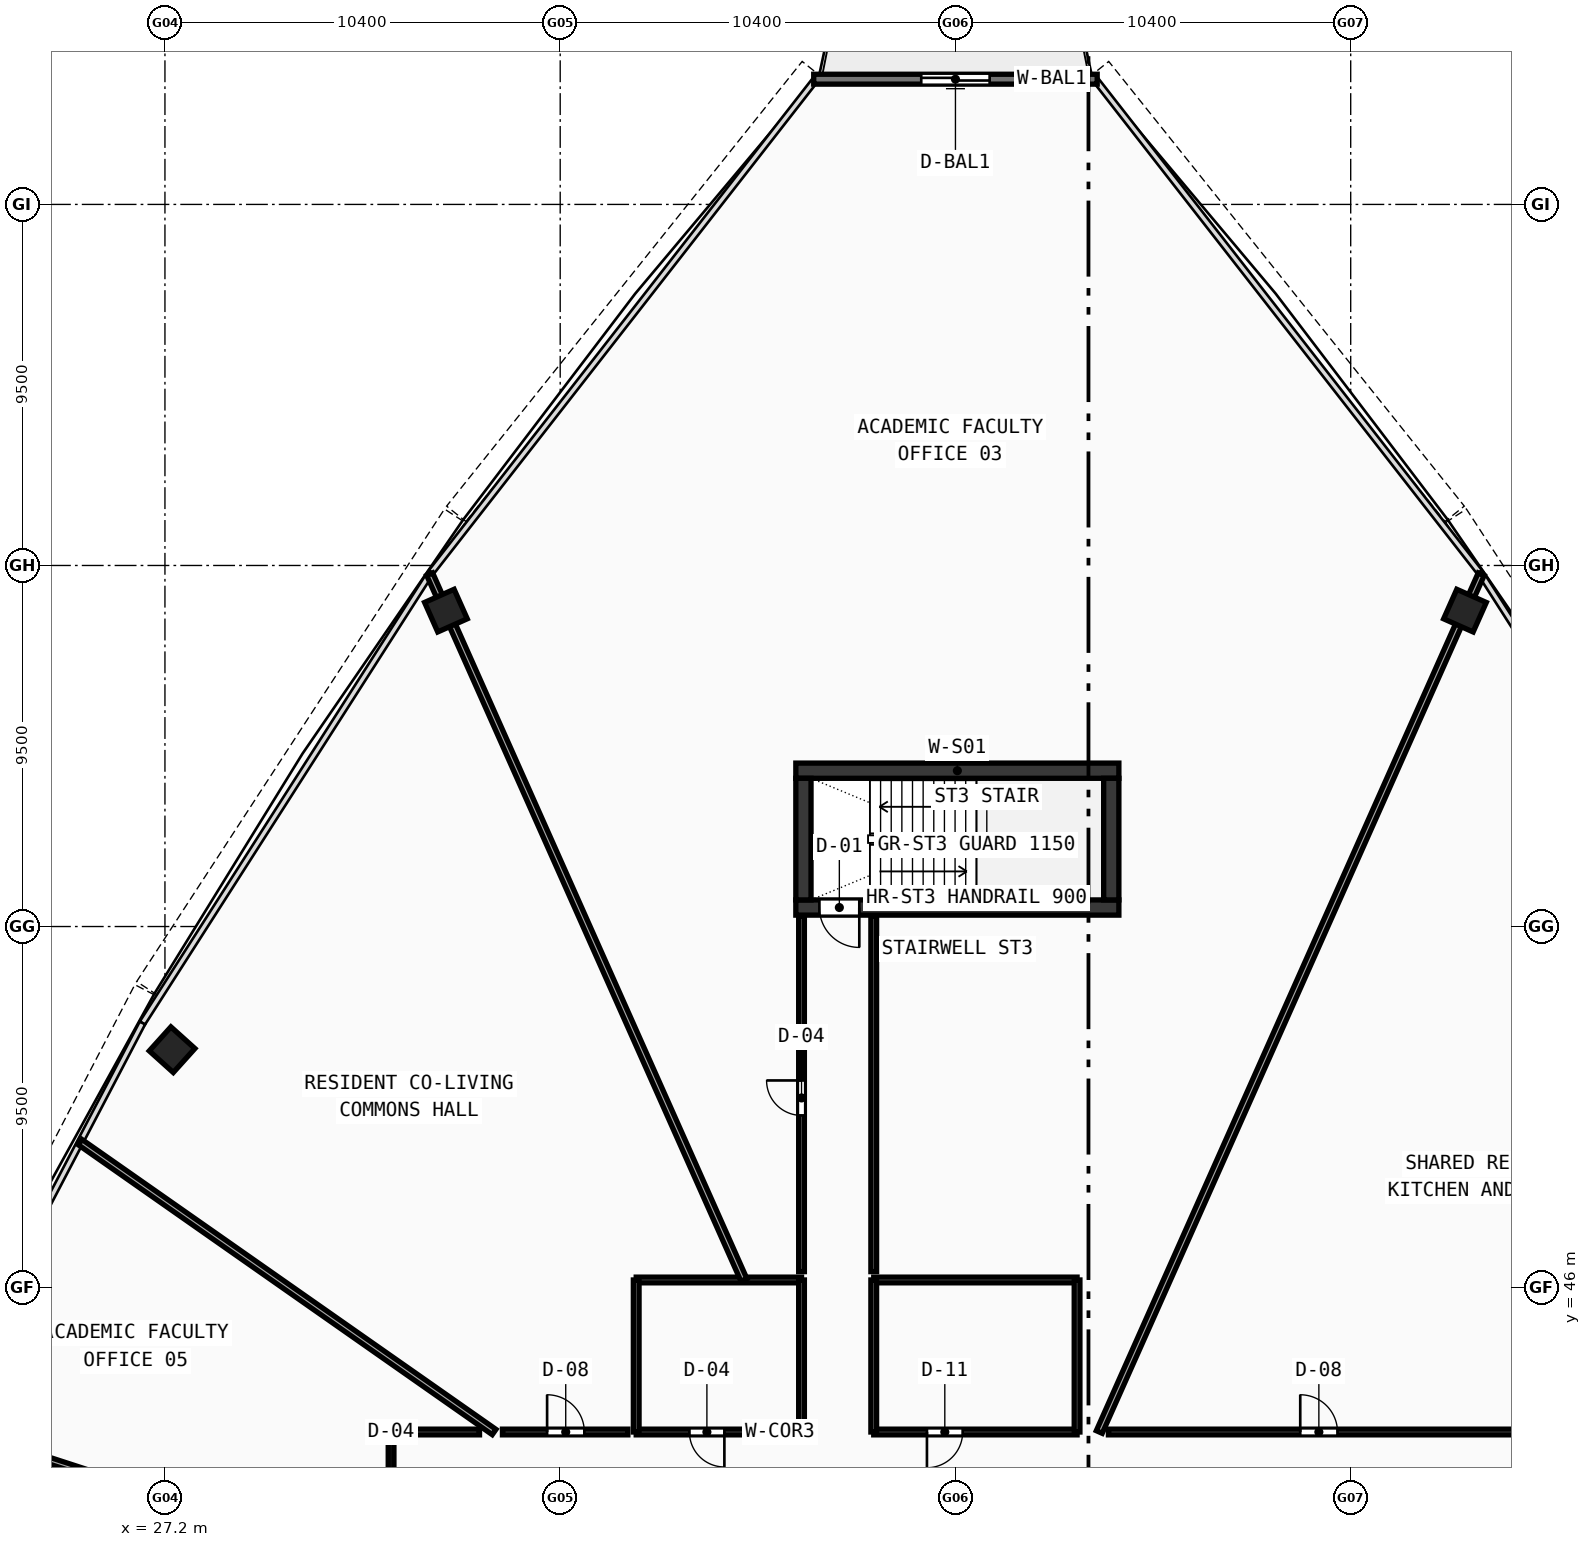
"""IFC4 building model, lengths in metres.
Left out: names, types, materials, properties, quantities, classifications, styles, units other than length and angle.
Written with IfcOpenShell. Run it as: python <this file> out.ifc"""

import sys

from ifc_helpers import new_model, si_unit, direction, frame, frame_2d, origin, origin_with_axes, origin_2d, place, context, subcontext, project, spatial, rectangle, hollow_rectangle, extrude, source, transform, mapped, element, fill, save


model = new_model("IFC4")
c1 = context("Model", 3, precision=1e-05, world=origin(), true_north=direction((0.0, 1.0)))
c2 = subcontext(c1, "Body", "Model", "MODEL_VIEW")
j1 = project(units=[si_unit("LENGTHUNIT", "METRE"), si_unit("PLANEANGLEUNIT", "RADIAN")], contexts=[c1])
p1 = place(None, origin())
s1 = spatial("IfcSite", under=j1, at=p1, CompositionType="ELEMENT")
p2 = place(p1, origin())
s2 = spatial("IfcBuilding", under=s1, at=p2, CompositionType="ELEMENT")
p3 = place(p2, frame((0.0, 0.0, 263.18)))
s3 = spatial("IfcBuildingStorey", under=s2, at=p3, CompositionType="ELEMENT", Elevation=263.18)
p4 = place(p3, frame((43.8, 59.6, 0.0), z_axis=(0.0, 0.0, 1.0), x_axis=(1.0, 0.0, 0.0)))
e1 = element("IfcWall", 1, at=p4, inside=s3, PredefinedType="SHEAR", context=c2, shape_type="SweptSolid", body=[
    extrude(rectangle(XDim=8.5, YDim=0.4, at=frame_2d((4.25, 0.0))), origin(), (0.0, 0.0, 1.0), 3.47),
])
p5 = place(p3, frame((43.8, 56.0, 0.0), z_axis=(0.0, 0.0, 1.0), x_axis=(1.0, 0.0, 0.0)))
e2 = element("IfcWall", 2, at=p5, inside=s3, PredefinedType="SHEAR", context=c2, shape_type="SweptSolid", body=[
    extrude(rectangle(XDim=8.5, YDim=0.4, at=frame_2d((4.25, 0.0))), origin(), (0.0, 0.0, 1.0), 3.47),
])
p6 = place(p5, frame((0.62, 0.0, 0.0)))
e3 = element("IfcOpeningElement", 3, at=p6, cuts=e2, PredefinedType="OPENING", context=c2, shape_type="SweptSolid", body=[
    extrude(rectangle(XDim=1.05, YDim=2.1, at=frame_2d((0.525, 1.05))), frame((0.0, 0.21, 0.0), z_axis=(0.0, -1.0, 0.0), x_axis=(1.0, 0.0, 0.0)), (0.0, 0.0, 1.0), 0.42),
])
for number, where, z_axis, x_axis in (
    (4, (44.0, 56.2, 0.0), (0.0, 0.0, 1.0), (0.0, 1.0, 0.0)),
    (5, (52.1, 56.2, 0.0), (0.0, 0.0, 1.0), (0.0, 1.0, 0.0)),
):
    element("IfcWall", number, at=place(p3, frame(where, z_axis=z_axis, x_axis=x_axis)), inside=s3, PredefinedType="SHEAR", context=c2, shape_type="SweptSolid", body=[
        extrude(rectangle(XDim=3.2, YDim=0.4, at=frame_2d((1.6, 0.0))), origin(), (0.0, 0.0, 1.0), 3.47),
    ])
m1 = source(origin(), c2, "Body", "SweptSolid", [
    extrude(hollow_rectangle(XDim=0.85, YDim=0.85, WallThickness=0.034, at=origin_2d()), origin(), (0.0, 0.0, 1.0), 3.73),
])
for number, where, z_axis, x_axis in (
    (6, (61.407, 63.812, -0.26), (0.0, 0.0, 1.0), (-0.914, 0.407, 0.0)),
    (7, (34.593, 63.812, -0.26), (0.0, 0.0, 1.0), (-0.914, -0.407, 0.0)),
    (8, (27.388, 52.259, -0.26), (0.0, 0.0, 1.0), (-0.669, -0.743, 0.0)),
):
    element("IfcColumn", number, at=place(p3, frame(where, z_axis=z_axis, x_axis=x_axis)), inside=s3, PredefinedType="COLUMN", context=c2, shape_type="MappedRepresentation", body=[
        mapped(m1, transform((0.0, 0.0, 0.0), scale=1.0)),
    ])
p7 = place(p3, frame((51.729, 77.795, 0.0), z_axis=(0.0, 0.0, 1.0), x_axis=(-1.0, 0.0, 0.0)))
e9 = element("IfcWall", 9, at=p7, inside=s3, PredefinedType="STANDARD", context=c2, shape_type="SweptSolid", body=[
    extrude(rectangle(XDim=7.458, YDim=0.26, at=frame_2d((3.729, 0.0))), origin(), (0.0, 0.0, 1.0), 3.47),
])
p8 = place(p7, frame((2.829, 0.0, 0.0)))
e10 = element("IfcOpeningElement", 10, at=p8, cuts=e9, PredefinedType="OPENING", context=c2, shape_type="SweptSolid", body=[
    extrude(rectangle(XDim=1.8, YDim=2.15, at=frame_2d((0.9, 1.075))), frame((0.0, 0.14, 0.0), z_axis=(0.0, -1.0, 0.0), x_axis=(1.0, 0.0, 0.0)), (0.0, 0.0, 1.0), 0.28),
])
p9 = place(p3, frame((39.6, 42.2, 0.0), z_axis=(0.0, 0.0, 1.0), x_axis=(1.0, 0.0, 0.0)))
e11 = element("IfcWall", 11, at=p9, inside=s3, PredefinedType="PARTITIONING", context=c2, shape_type="SweptSolid", body=[
    extrude(rectangle(XDim=4.35, YDim=0.15, at=frame_2d((2.175, 0.0))), origin(), (0.0, 0.0, 1.0), 3.47),
])
p10 = place(p9, frame((1.4, 0.0, 0.0)))
e12 = element("IfcOpeningElement", 12, at=p10, cuts=e11, PredefinedType="OPENING", context=c2, shape_type="SweptSolid", body=[
    extrude(rectangle(XDim=0.92, YDim=2.1, at=frame_2d((0.46, 1.05))), frame((0.0, 0.085, 0.0), z_axis=(0.0, -1.0, 0.0), x_axis=(1.0, 0.0, 0.0)), (0.0, 0.0, 1.0), 0.17),
])
p11 = place(p3, frame((39.6, 46.2, 0.0), z_axis=(0.0, 0.0, 1.0), x_axis=(1.0, 0.0, 0.0)))
e13 = element("IfcWall", 13, at=p11, inside=s3, PredefinedType="PARTITIONING", context=c2, shape_type="SweptSolid", body=[
    extrude(rectangle(XDim=4.35, YDim=0.15, at=frame_2d((2.175, 0.0))), origin(), (0.0, 0.0, 1.0), 2.82),
])
p12 = place(p3, frame((39.6, 42.2, 0.0), z_axis=(0.0, 0.0, 1.0), x_axis=(0.0, 1.0, 0.0)))
e14 = element("IfcWall", 14, at=p12, inside=s3, PredefinedType="PARTITIONING", context=c2, shape_type="SweptSolid", body=[
    extrude(rectangle(XDim=4.0, YDim=0.15, at=frame_2d((2.0, 0.0))), origin(), (0.0, 0.0, 1.0), 3.47),
])
p13 = place(p3, frame((43.95, 42.2, 0.0), z_axis=(0.0, 0.0, 1.0), x_axis=(0.0, 1.0, 0.0)))
e15 = element("IfcWall", 15, at=p13, inside=s3, PredefinedType="PARTITIONING", context=c2, shape_type="SweptSolid", body=[
    extrude(rectangle(XDim=4.0, YDim=0.15, at=frame_2d((2.0, 0.0))), origin(), (0.0, 0.0, 1.0), 2.82),
])
p14 = place(p3, frame((45.85, 42.2, 0.0), z_axis=(0.0, 0.0, 1.0), x_axis=(1.0, 0.0, 0.0)))
e16 = element("IfcWall", 16, at=p14, inside=s3, PredefinedType="PARTITIONING", context=c2, shape_type="SweptSolid", body=[
    extrude(rectangle(XDim=5.35, YDim=0.15, at=frame_2d((2.675, 0.0))), origin(), (0.0, 0.0, 1.0), 3.47),
])
p15 = place(p14, frame((1.4, 0.0, 0.0)))
e17 = element("IfcOpeningElement", 17, at=p15, cuts=e16, PredefinedType="OPENING", context=c2, shape_type="SweptSolid", body=[
    extrude(rectangle(XDim=0.94, YDim=2.1, at=frame_2d((0.47, 1.05))), frame((0.0, 0.085, 0.0), z_axis=(0.0, -1.0, 0.0), x_axis=(1.0, 0.0, 0.0)), (0.0, 0.0, 1.0), 0.17),
])
p16 = place(p3, frame((45.85, 46.2, 0.0), z_axis=(0.0, 0.0, 1.0), x_axis=(1.0, 0.0, 0.0)))
e18 = element("IfcWall", 18, at=p16, inside=s3, PredefinedType="PARTITIONING", context=c2, shape_type="SweptSolid", body=[
    extrude(rectangle(XDim=5.35, YDim=0.15, at=frame_2d((2.675, 0.0))), origin(), (0.0, 0.0, 1.0), 3.47),
])
for number, where, z_axis, x_axis in (
    (19, (45.85, 42.2, 0.0), (0.0, 0.0, 1.0), (0.0, 1.0, 0.0)),
    (20, (51.2, 42.2, 0.0), (0.0, 0.0, 1.0), (0.0, 1.0, 0.0)),
):
    element("IfcWall", number, at=place(p3, frame(where, z_axis=z_axis, x_axis=x_axis)), inside=s3, PredefinedType="PARTITIONING", context=c2, shape_type="SweptSolid", body=[
        extrude(rectangle(XDim=4.0, YDim=0.15, at=frame_2d((2.0, 0.0))), origin(), (0.0, 0.0, 1.0), 3.47),
    ])
p17 = place(p3, frame((51.784, 42.2, 0.0), z_axis=(0.0, 0.0, 1.0), x_axis=(0.406737985753, 0.913544859843, 0.0)))
e21 = element("IfcWall", 21, at=p17, inside=s3, PredefinedType="PARTITIONING", context=c2, shape_type="SweptSolid", body=[
    extrude(rectangle(XDim=24.707, YDim=0.17, at=frame_2d((12.354, 0.0))), origin(), (0.0, 0.0, 1.0), 2.82),
])
p18 = place(p3, frame((42.435, 46.2, 0.0), z_axis=(0.0, 0.0, 1.0), x_axis=(-0.406734534197, 0.913546396573, 0.0)))
e22 = element("IfcWall", 22, at=p18, inside=s3, PredefinedType="PARTITIONING", context=c2, shape_type="SweptSolid", body=[
    extrude(rectangle(XDim=20.329, YDim=0.17, at=frame_2d((10.164, 0.0))), origin(), (0.0, 0.0, 1.0), 2.82),
])
p19 = place(p3, frame((35.861, 42.2, 0.0), z_axis=(0.0, 0.0, 1.0), x_axis=(-0.819147381932, 0.57358309483, 0.0)))
e23 = element("IfcWall", 23, at=p19, inside=s3, PredefinedType="PARTITIONING", context=c2, shape_type="SweptSolid", body=[
    extrude(rectangle(XDim=13.297, YDim=0.17, at=frame_2d((6.649, 0.0))), origin(), (0.0, 0.0, 1.0), 2.82),
])
p20 = place(p3, frame((33.15, 38.525, 0.0), z_axis=(0.0, 0.0, 1.0), x_axis=(-0.951057436246, 0.309014163043, 0.0)))
e24 = element("IfcWall", 24, at=p20, inside=s3, PredefinedType="PARTITIONING", context=c2, shape_type="SweptSolid", body=[
    extrude(rectangle(XDim=12.667, YDim=0.17, at=frame_2d((6.333, 0.0))), origin(), (0.0, 0.0, 1.0), 2.82),
])
p21 = place(p3, frame((33.15, 38.756, 0.0), z_axis=(0.0, 0.0, 1.0), x_axis=(0.0, 1.0, 0.0)))
e25 = element("IfcWall", 25, at=p21, inside=s3, PredefinedType="PARTITIONING", context=c2, shape_type="SweptSolid", body=[
    extrude(rectangle(XDim=3.444, YDim=0.15, at=frame_2d((1.722, 0.0))), origin(), (0.0, 0.0, 1.0), 3.12),
])
p22 = place(p21, frame((1.376, 0.0, 0.0)))
e26 = element("IfcOpeningElement", 26, at=p22, cuts=e25, PredefinedType="OPENING", context=c2, shape_type="SweptSolid", body=[
    extrude(rectangle(XDim=0.92, YDim=2.1, at=frame_2d((0.46, 1.05))), frame((0.0, 0.085, 0.0), z_axis=(0.0, -1.0, 0.0), x_axis=(1.0, 0.0, 0.0)), (0.0, 0.0, 1.0), 0.17),
])
p23 = place(p3, frame((33.15, 42.2, 0.0), z_axis=(0.0, 0.0, 1.0), x_axis=(1.0, 0.0, 0.0)))
e27 = element("IfcWall", 27, at=p23, inside=s3, PredefinedType="PARTITIONING", context=c2, shape_type="SweptSolid", body=[
    extrude(rectangle(XDim=2.327, YDim=0.15, at=frame_2d((1.164, 0.0))), origin(), (0.0, 0.0, 1.0), 3.12),
])
p24 = place(p3, frame((36.081, 42.2, 0.0), z_axis=(0.0, 0.0, 1.0), x_axis=(1.0, 0.0, 0.0)))
e28 = element("IfcWall", 28, at=p24, inside=s3, PredefinedType="PARTITIONING", context=c2, shape_type="SweptSolid", body=[
    extrude(rectangle(XDim=3.299, YDim=0.15, at=frame_2d((1.65, 0.0))), origin(), (0.0, 0.0, 1.0), 2.82),
])
p25 = place(p24, frame((1.175, 0.0, 0.0)))
e29 = element("IfcOpeningElement", 29, at=p25, cuts=e28, PredefinedType="OPENING", context=c2, shape_type="SweptSolid", body=[
    extrude(rectangle(XDim=0.98, YDim=2.12, at=frame_2d((0.49, 1.06))), frame((0.0, 0.085, 0.0), z_axis=(0.0, -1.0, 0.0), x_axis=(1.0, 0.0, 0.0)), (0.0, 0.0, 1.0), 0.17),
])
p26 = place(p3, frame((43.95, 46.42, 0.0), z_axis=(0.0, 0.0, 1.0), x_axis=(0.0, 1.0, 0.0)))
e30 = element("IfcWall", 30, at=p26, inside=s3, PredefinedType="PARTITIONING", context=c2, shape_type="SweptSolid", body=[
    extrude(rectangle(XDim=9.36, YDim=0.15, at=frame_2d((4.68, 0.0))), origin(), (0.0, 0.0, 1.0), 3.12),
])
p27 = place(p26, frame((4.11, 0.0, 0.0)))
e31 = element("IfcOpeningElement", 31, at=p27, cuts=e30, PredefinedType="OPENING", context=c2, shape_type="SweptSolid", body=[
    extrude(rectangle(XDim=0.92, YDim=2.1, at=frame_2d((0.46, 1.05))), frame((0.0, 0.085, 0.0), z_axis=(0.0, -1.0, 0.0), x_axis=(1.0, 0.0, 0.0)), (0.0, 0.0, 1.0), 0.17),
])
p28 = place(p3, frame((45.85, 55.78, 0.0), z_axis=(0.0, 0.0, 1.0), x_axis=(0.0, -1.0, 0.0)))
e32 = element("IfcWall", 32, at=p28, inside=s3, PredefinedType="PARTITIONING", context=c2, shape_type="SweptSolid", body=[
    extrude(rectangle(XDim=9.36, YDim=0.15, at=frame_2d((4.68, 0.0))), origin(), (0.0, 0.0, 1.0), 3.12),
])
p29 = place(p3, frame((52.025, 42.2, 0.0), z_axis=(0.0, 0.0, 1.0), x_axis=(1.0, 0.0, 0.0)))
e33 = element("IfcWall", 33, at=p29, inside=s3, PredefinedType="PARTITIONING", context=c2, shape_type="SweptSolid", body=[
    extrude(rectangle(XDim=10.825, YDim=0.15, at=frame_2d((5.413, 0.0))), origin(), (0.0, 0.0, 1.0), 2.82),
])
p30 = place(p29, frame((5.047, 0.0, 0.0)))
e34 = element("IfcOpeningElement", 34, at=p30, cuts=e33, PredefinedType="OPENING", context=c2, shape_type="SweptSolid", body=[
    extrude(rectangle(XDim=0.98, YDim=2.12, at=frame_2d((0.49, 1.06))), frame((0.0, 0.085, 0.0), z_axis=(0.0, -1.0, 0.0), x_axis=(1.0, 0.0, 0.0)), (0.0, 0.0, 1.0), 0.17),
])
m2 = source(origin(), c2, "Body", "SweptSolid", [
    extrude(rectangle(XDim=1.8, YDim=2.15, at=frame_2d((0.9, 1.075))), frame((0.0, 0.025, 0.0), z_axis=(0.0, -1.0, 0.0), x_axis=(1.0, 0.0, 0.0)), (0.0, 0.0, 1.0), 0.05),
])
p31 = place(p8, origin_with_axes())
e35 = element("IfcDoor", 35, at=p31, inside=s3, OperationType="DOUBLE_DOOR_SLIDING", PredefinedType="DOOR", context=c2, shape_type="MappedRepresentation", body=[
    mapped(m2, transform((0.0, 0.0, 0.0), scale=1.0)),
])
fill(e10, e35)
m3 = source(origin(), c2, "Body", "SweptSolid", [
    extrude(rectangle(XDim=1.05, YDim=2.1, at=frame_2d((0.525, 1.05))), frame((0.0, 0.025, 0.0), z_axis=(0.0, -1.0, 0.0), x_axis=(1.0, 0.0, 0.0)), (0.0, 0.0, 1.0), 0.05),
])
p32 = place(p6, frame((1.05, 0.0, 0.0), z_axis=(0.0, 0.0, 1.0), x_axis=(-1.0, 0.0, 0.0)))
e36 = element("IfcDoor", 36, at=p32, inside=s3, OperationType="SINGLE_SWING_LEFT", PredefinedType="DOOR", context=c2, shape_type="MappedRepresentation", body=[
    mapped(m3, transform((0.0, 0.0, 0.0), scale=1.0)),
])
fill(e3, e36)
m4 = source(origin(), c2, "Body", "SweptSolid", [
    extrude(rectangle(XDim=0.92, YDim=2.1, at=frame_2d((0.46, 1.05))), frame((0.0, 0.025, 0.0), z_axis=(0.0, -1.0, 0.0), x_axis=(1.0, 0.0, 0.0)), (0.0, 0.0, 1.0), 0.05),
])
p33 = place(p10, frame((0.92, 0.0, 0.0), z_axis=(0.0, 0.0, 1.0), x_axis=(-1.0, 0.0, 0.0)))
e37 = element("IfcDoor", 37, at=p33, inside=s3, OperationType="SINGLE_SWING_LEFT", PredefinedType="DOOR", context=c2, shape_type="MappedRepresentation", body=[
    mapped(m4, transform((0.0, 0.0, 0.0), scale=1.0)),
])
fill(e12, e37)
m5 = source(origin(), c2, "Body", "SweptSolid", [
    extrude(rectangle(XDim=0.94, YDim=2.1, at=frame_2d((0.47, 1.05))), frame((0.0, 0.025, 0.0), z_axis=(0.0, -1.0, 0.0), x_axis=(1.0, 0.0, 0.0)), (0.0, 0.0, 1.0), 0.05),
])
p34 = place(p15, frame((0.94, 0.0, 0.0), z_axis=(0.0, 0.0, 1.0), x_axis=(-1.0, 0.0, 0.0)))
e38 = element("IfcDoor", 38, at=p34, inside=s3, OperationType="SINGLE_SWING_RIGHT", PredefinedType="DOOR", context=c2, shape_type="MappedRepresentation", body=[
    mapped(m5, transform((0.0, 0.0, 0.0), scale=1.0)),
])
fill(e17, e38)
m6 = source(origin(), c2, "Body", "SweptSolid", [
    extrude(rectangle(XDim=0.98, YDim=2.12, at=frame_2d((0.49, 1.06))), frame((0.0, 0.025, 0.0), z_axis=(0.0, -1.0, 0.0), x_axis=(1.0, 0.0, 0.0)), (0.0, 0.0, 1.0), 0.05),
])
p35 = place(p30, origin_with_axes())
e39 = element("IfcDoor", 39, at=p35, inside=s3, OperationType="SINGLE_SWING_LEFT", PredefinedType="DOOR", context=c2, shape_type="MappedRepresentation", body=[
    mapped(m6, transform((0.0, 0.0, 0.0), scale=1.0)),
])
fill(e34, e39)
p36 = place(p27, origin_with_axes())
e40 = element("IfcDoor", 40, at=p36, inside=s3, OperationType="SINGLE_SWING_RIGHT", PredefinedType="DOOR", context=c2, shape_type="MappedRepresentation", body=[
    mapped(m4, transform((0.0, 0.0, 0.0), scale=1.0)),
])
fill(e31, e40)
p37 = place(p25, origin_with_axes())
e41 = element("IfcDoor", 41, at=p37, inside=s3, OperationType="SINGLE_SWING_LEFT", PredefinedType="DOOR", context=c2, shape_type="MappedRepresentation", body=[
    mapped(m6, transform((0.0, 0.0, 0.0), scale=1.0)),
])
fill(e29, e41)
save(model, sys.argv[1])
